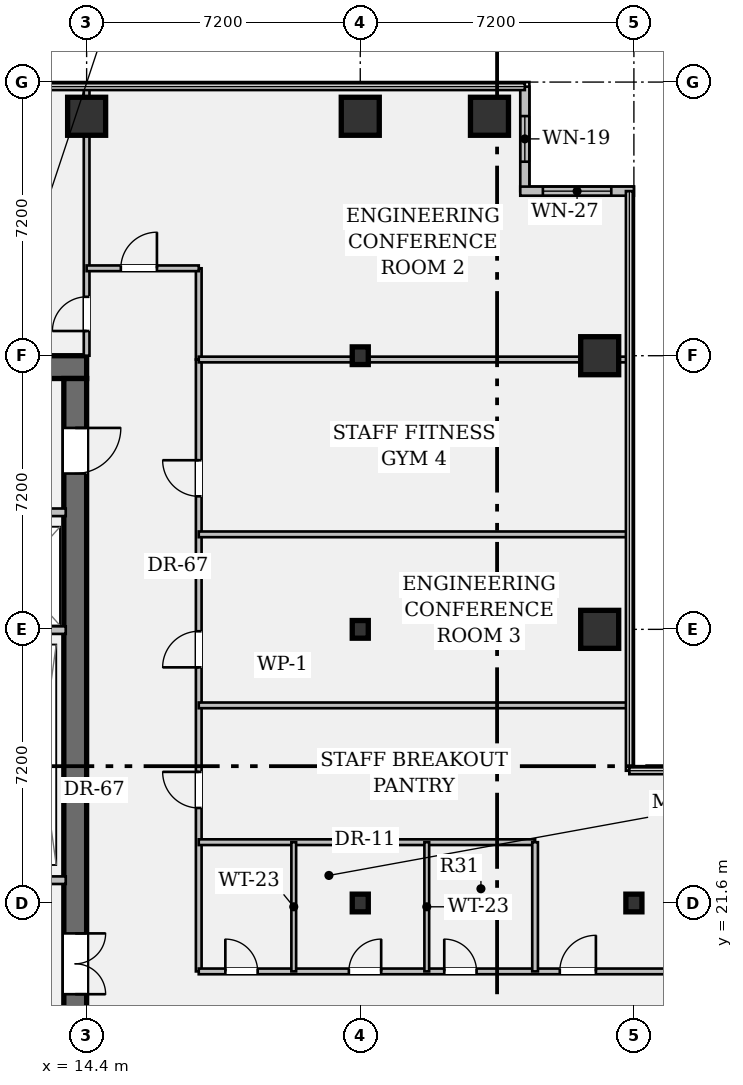
"""IFC4 building model, lengths in metres.
Left out: names, types, materials, properties, quantities, classifications, styles, units other than length and angle.
Written with IfcOpenShell. Run it as: python <this file> out.ifc"""

import sys

from ifc_helpers import new_model, si_unit, direction, frame, frame_2d, origin, origin_2d, place, context, subcontext, project, spatial, rectangle, hollow_rectangle, i_section, extrude, element, fill, save


model = new_model("IFC4")
c1 = context("Model", 3, precision=1e-05, world=origin(), true_north=direction((0.0, 1.0)))
c2 = subcontext(c1, "Body", "Model", "MODEL_VIEW")
j1 = project(units=[si_unit("LENGTHUNIT", "METRE"), si_unit("PLANEANGLEUNIT", "RADIAN")], contexts=[c1])
p1 = place(None, origin())
s1 = spatial("IfcSite", under=j1, at=p1, CompositionType="ELEMENT")
p2 = place(p1, origin())
s2 = spatial("IfcBuilding", under=s1, at=p2, CompositionType="ELEMENT")
p3 = place(p2, frame((0.0, 0.0, 73.5)))
s3 = spatial("IfcBuildingStorey", under=s2, at=p3, CompositionType="ELEMENT", Elevation=73.5)
p4 = place(p3, frame((0.6, 35.7, 0.0), z_axis=(0.0, 0.0, 1.0), x_axis=(1.0, 0.0, 0.0)))
e1 = element("IfcWall", 1, at=p4, inside=s3, PredefinedType="SHEAR", context=c2, shape_type="SweptSolid", body=[
    extrude(rectangle(XDim=13.8, YDim=0.6, at=frame_2d((6.9, 0.0))), origin(), (0.0, 0.0, 1.0), 3.57),
])
p5 = place(p3, frame((14.1, 35.4, 0.0), z_axis=(0.0, 0.0, 1.0), x_axis=(0.0, -1.0, 0.0)))
e2 = element("IfcWall", 2, at=p5, inside=s3, PredefinedType="SHEAR", context=c2, shape_type="SweptSolid", body=[
    extrude(rectangle(XDim=27.6, YDim=0.6, at=frame_2d((13.8, 0.0))), origin(), (0.0, 0.0, 1.0), 3.57),
])
p6 = place(p5, frame((1.3, 0.0, 0.0)))
e3 = element("IfcOpeningElement", 3, at=p6, cuts=e2, PredefinedType="OPENING", context=c2, shape_type="SweptSolid", body=[
    extrude(rectangle(XDim=1.2, YDim=2.15, at=frame_2d((0.6, 1.075))), frame((0.0, 0.312, 0.0), z_axis=(0.0, -1.0, 0.0), x_axis=(1.0, 0.0, 0.0)), (0.0, 0.0, 1.0), 0.624),
])
p7 = place(p5, frame((25.25, 0.0, 0.0)))
e4 = element("IfcOpeningElement", 4, at=p7, cuts=e2, PredefinedType="OPENING", context=c2, shape_type="SweptSolid", body=[
    extrude(rectangle(XDim=1.2, YDim=2.15, at=frame_2d((0.6, 1.075))), frame((0.0, 0.312, 0.0), z_axis=(0.0, -1.0, 0.0), x_axis=(1.0, 0.0, 0.0)), (0.0, 0.0, 1.0), 0.624),
])
p8 = place(p5, frame((14.6, 0.0, 0.0)))
e5 = element("IfcOpeningElement", 5, at=p8, cuts=e2, PredefinedType="OPENING", context=c2, shape_type="SweptSolid", body=[
    extrude(rectangle(XDim=1.6, YDim=2.2, at=frame_2d((0.8, 1.1))), frame((0.0, 0.312, 0.0), z_axis=(0.0, -1.0, 0.0), x_axis=(1.0, 0.0, 0.0)), (0.0, 0.0, 1.0), 0.624),
])
p9 = place(p3, frame((14.4, 42.3, 0.0), z_axis=(0.0, 0.0, 1.0), x_axis=(1.0, 0.0, 0.0)))
e6 = element("IfcColumn", 6, at=p9, inside=s3, PredefinedType="COLUMN", context=c2, shape_type="SweptSolid", body=[
    extrude(hollow_rectangle(XDim=1.0, YDim=1.0, WallThickness=0.065, at=origin_2d()), origin(), (0.0, 0.0, 1.0), 3.57),
])
for number, where, z_axis, x_axis in (
    (7, (21.6, 21.6, 0.0), (0.0, 0.0, 1.0), (1.0, 0.0, 0.0)),
    (8, (21.6, 28.8, 0.0), (0.0, 0.0, 1.0), (1.0, 0.0, 0.0)),
    (9, (21.6, 36.0, 0.0), (0.0, 0.0, 1.0), (1.0, 0.0, 0.0)),
):
    element("IfcColumn", number, at=place(p3, frame(where, z_axis=z_axis, x_axis=x_axis)), inside=s3, PredefinedType="COLUMN", context=c2, shape_type="SweptSolid", body=[
        extrude(i_section(OverallWidth=0.422, OverallDepth=0.465, WebThickness=0.045, FlangeThickness=0.073, FilletRadius=0.018, at=origin_2d()), origin(), (0.0, 0.0, 1.0), 3.57),
    ])
for number, where, z_axis, x_axis in (
    (10, (21.6, 42.3, 0.0), (0.0, 0.0, 1.0), (1.0, 0.0, 0.0)),
    (11, (25.0, 42.3, 0.0), (0.0, 0.0, 1.0), (1.0, 0.0, 0.0)),
    (12, (27.9, 28.8, 0.0), (0.0, 0.0, 1.0), (1.0, 0.0, 0.0)),
    (13, (27.9, 36.0, 0.0), (0.0, 0.0, 1.0), (1.0, 0.0, 0.0)),
):
    element("IfcColumn", number, at=place(p3, frame(where, z_axis=z_axis, x_axis=x_axis)), inside=s3, PredefinedType="COLUMN", context=c2, shape_type="SweptSolid", body=[
        extrude(hollow_rectangle(XDim=1.0, YDim=1.0, WallThickness=0.065, at=origin_2d()), origin(), (0.0, 0.0, 1.0), 3.57),
    ])
p10 = place(p3, frame((28.8, 21.6, 0.0), z_axis=(0.0, 0.0, 1.0), x_axis=(1.0, 0.0, 0.0)))
e14 = element("IfcColumn", 14, at=p10, inside=s3, PredefinedType="COLUMN", context=c2, shape_type="SweptSolid", body=[
    extrude(i_section(OverallWidth=0.422, OverallDepth=0.465, WebThickness=0.045, FlangeThickness=0.073, FilletRadius=0.018, at=origin_2d()), origin(), (0.0, 0.0, 1.0), 3.57),
])
p11 = place(p3, frame((25.93, 43.08, 0.0), z_axis=(0.0, 0.0, 1.0), x_axis=(0.0, -1.0, 0.0)))
e15 = element("IfcWall", 15, at=p11, inside=s3, PredefinedType="STANDARD", context=c2, shape_type="SweptSolid", body=[
    extrude(rectangle(XDim=2.75, YDim=0.24, at=frame_2d((1.375, 0.0))), origin(), (0.0, 0.0, 1.0), 3.57),
])
p12 = place(p11, frame((0.775, 0.0, 0.95)))
e16 = element("IfcOpeningElement", 16, at=p12, cuts=e15, PredefinedType="OPENING", context=c2, shape_type="SweptSolid", body=[
    extrude(rectangle(XDim=1.2, YDim=1.8, at=frame_2d((0.6, 0.9))), frame((0.0, 0.132, 0.0), z_axis=(0.0, -1.0, 0.0), x_axis=(1.0, 0.0, 0.0)), (0.0, 0.0, 1.0), 0.264),
])
p13 = place(p3, frame((25.81, 40.33, 0.0), z_axis=(0.0, 0.0, 1.0), x_axis=(1.0, 0.0, 0.0)))
e17 = element("IfcWall", 17, at=p13, inside=s3, PredefinedType="STANDARD", context=c2, shape_type="SweptSolid", body=[
    extrude(rectangle(XDim=2.99, YDim=0.24, at=frame_2d((1.495, 0.0))), origin(), (0.0, 0.0, 1.0), 3.57),
])
p14 = place(p13, frame((0.595, 0.0, 0.95)))
e18 = element("IfcOpeningElement", 18, at=p14, cuts=e17, PredefinedType="OPENING", context=c2, shape_type="SweptSolid", body=[
    extrude(rectangle(XDim=1.8, YDim=1.35, at=frame_2d((0.9, 0.675))), frame((0.0, 0.132, 0.0), z_axis=(0.0, -1.0, 0.0), x_axis=(1.0, 0.0, 0.0)), (0.0, 0.0, 1.0), 0.264),
])
p15 = place(p3, frame((8.7, 31.88, 0.0), z_axis=(0.0, 0.0, 1.0), x_axis=(1.0, 0.0, 0.0)))
e19 = element("IfcWall", 19, at=p15, inside=s3, PredefinedType="PARTITIONING", context=c2, shape_type="SweptSolid", body=[
    extrude(rectangle(XDim=5.15, YDim=0.2, at=frame_2d((2.575, 0.0))), origin(), (0.0, 0.0, 1.0), 3.57),
])
p16 = place(p15, frame((0.75, 0.0, 0.0)))
e20 = element("IfcOpeningElement", 20, at=p16, cuts=e19, PredefinedType="OPENING", context=c2, shape_type="SweptSolid", body=[
    extrude(rectangle(XDim=1.2, YDim=2.2, at=frame_2d((0.6, 1.1))), frame((0.0, 0.112, 0.0), z_axis=(0.0, -1.0, 0.0), x_axis=(1.0, 0.0, 0.0)), (0.0, 0.0, 1.0), 0.224),
])
p17 = place(p15, frame((3.25, 0.0, 0.0)))
e21 = element("IfcOpeningElement", 21, at=p17, cuts=e19, PredefinedType="OPENING", context=c2, shape_type="SweptSolid", body=[
    extrude(rectangle(XDim=1.2, YDim=2.2, at=frame_2d((0.6, 1.1))), frame((0.0, 0.112, 0.0), z_axis=(0.0, -1.0, 0.0), x_axis=(1.0, 0.0, 0.0)), (0.0, 0.0, 1.0), 0.224),
])
p18 = place(p3, frame((8.7, 28.78, 0.0), z_axis=(0.0, 0.0, 1.0), x_axis=(1.0, 0.0, 0.0)))
e22 = element("IfcWall", 22, at=p18, inside=s3, PredefinedType="PARTITIONING", context=c2, shape_type="SweptSolid", body=[
    extrude(rectangle(XDim=5.15, YDim=0.2, at=frame_2d((2.575, 0.0))), origin(), (0.0, 0.0, 1.0), 3.57),
])
p19 = place(p3, frame((7.1, 22.2, 0.0), z_axis=(0.0, 0.0, 1.0), x_axis=(1.0, 0.0, 0.0)))
e23 = element("IfcWall", 23, at=p19, inside=s3, PredefinedType="PARTITIONING", context=c2, shape_type="SweptSolid", body=[
    extrude(rectangle(XDim=6.75, YDim=0.2, at=frame_2d((3.375, 0.0))), origin(), (0.0, 0.0, 1.0), 3.57),
])
p20 = place(p3, frame((17.35, 19.8, 0.0), z_axis=(0.0, 0.0, 1.0), x_axis=(0.0, 1.0, 0.0)))
e24 = element("IfcWall", 24, at=p20, inside=s3, PredefinedType="PARTITIONING", context=c2, shape_type="SweptSolid", body=[
    extrude(rectangle(XDim=16.1, YDim=0.15, at=frame_2d((8.05, 0.0))), origin(), (0.0, 0.0, 1.0), 2.783),
])
p21 = place(p20, frame((4.3, 0.0, 0.0)))
e25 = element("IfcOpeningElement", 25, at=p21, cuts=e24, PredefinedType="OPENING", context=c2, shape_type="SweptSolid", body=[
    extrude(rectangle(XDim=0.95, YDim=2.15, at=frame_2d((0.475, 1.075))), frame((0.0, 0.087, 0.0), z_axis=(0.0, -1.0, 0.0), x_axis=(1.0, 0.0, 0.0)), (0.0, 0.0, 1.0), 0.174),
])
p22 = place(p20, frame((8.0, 0.0, 0.0)))
e26 = element("IfcOpeningElement", 26, at=p22, cuts=e24, PredefinedType="OPENING", context=c2, shape_type="SweptSolid", body=[
    extrude(rectangle(XDim=0.95, YDim=2.15, at=frame_2d((0.475, 1.075))), frame((0.0, 0.087, 0.0), z_axis=(0.0, -1.0, 0.0), x_axis=(1.0, 0.0, 0.0)), (0.0, 0.0, 1.0), 0.174),
])
p23 = place(p20, frame((12.5, 0.0, 0.0)))
e27 = element("IfcOpeningElement", 27, at=p23, cuts=e24, PredefinedType="OPENING", context=c2, shape_type="SweptSolid", body=[
    extrude(rectangle(XDim=0.95, YDim=2.15, at=frame_2d((0.475, 1.075))), frame((0.0, 0.087, 0.0), z_axis=(0.0, -1.0, 0.0), x_axis=(1.0, 0.0, 0.0)), (0.0, 0.0, 1.0), 0.174),
])
p24 = place(p3, frame((17.35, 19.8, 0.0), z_axis=(0.0, 0.0, 1.0), x_axis=(1.0, 0.0, 0.0)))
e28 = element("IfcWall", 28, at=p24, inside=s3, PredefinedType="PARTITIONING", context=c2, shape_type="SweptSolid", body=[
    extrude(rectangle(XDim=21.85, YDim=0.15, at=frame_2d((10.925, 0.0))), origin(), (0.0, 0.0, 1.0), 2.783),
])
p25 = place(p24, frame((0.7, 0.0, 0.0)))
e29 = element("IfcOpeningElement", 29, at=p25, cuts=e28, PredefinedType="OPENING", context=c2, shape_type="SweptSolid", body=[
    extrude(rectangle(XDim=0.85, YDim=2.15, at=frame_2d((0.425, 1.075))), frame((0.0, 0.087, 0.0), z_axis=(0.0, -1.0, 0.0), x_axis=(1.0, 0.0, 0.0)), (0.0, 0.0, 1.0), 0.174),
])
p26 = place(p24, frame((3.95, 0.0, 0.0)))
e30 = element("IfcOpeningElement", 30, at=p26, cuts=e28, PredefinedType="OPENING", context=c2, shape_type="SweptSolid", body=[
    extrude(rectangle(XDim=0.85, YDim=2.15, at=frame_2d((0.425, 1.075))), frame((0.0, 0.087, 0.0), z_axis=(0.0, -1.0, 0.0), x_axis=(1.0, 0.0, 0.0)), (0.0, 0.0, 1.0), 0.174),
])
p27 = place(p24, frame((6.46, 0.0, 0.0)))
e31 = element("IfcOpeningElement", 31, at=p27, cuts=e28, PredefinedType="OPENING", context=c2, shape_type="SweptSolid", body=[
    extrude(rectangle(XDim=0.85, YDim=2.15, at=frame_2d((0.425, 1.075))), frame((0.0, 0.087, 0.0), z_axis=(0.0, -1.0, 0.0), x_axis=(1.0, 0.0, 0.0)), (0.0, 0.0, 1.0), 0.174),
])
p28 = place(p24, frame((9.5, 0.0, 0.0)))
e32 = element("IfcOpeningElement", 32, at=p28, cuts=e28, PredefinedType="OPENING", context=c2, shape_type="SweptSolid", body=[
    extrude(rectangle(XDim=0.95, YDim=2.15, at=frame_2d((0.475, 1.075))), frame((0.0, 0.087, 0.0), z_axis=(0.0, -1.0, 0.0), x_axis=(1.0, 0.0, 0.0)), (0.0, 0.0, 1.0), 0.174),
])
p29 = place(p3, frame((14.4, 36.0, 0.0), z_axis=(0.0, 0.0, 1.0), x_axis=(0.0, 1.0, 0.0)))
e33 = element("IfcWall", 33, at=p29, inside=s3, PredefinedType="PARTITIONING", context=c2, shape_type="SweptSolid", body=[
    extrude(rectangle(XDim=7.08, YDim=0.15, at=frame_2d((3.54, 0.0))), origin(), (0.0, 0.0, 1.0), 2.783),
])
p30 = place(p29, frame((0.65, 0.0, 0.0)))
e34 = element("IfcOpeningElement", 34, at=p30, cuts=e33, PredefinedType="OPENING", context=c2, shape_type="SweptSolid", body=[
    extrude(rectangle(XDim=0.9, YDim=2.15, at=frame_2d((0.45, 1.075))), frame((0.0, 0.087, 0.0), z_axis=(0.0, -1.0, 0.0), x_axis=(1.0, 0.0, 0.0)), (0.0, 0.0, 1.0), 0.174),
])
p31 = place(p3, frame((17.35, 35.9, 0.0), z_axis=(0.0, 0.0, 1.0), x_axis=(0.0, 1.0, 0.0)))
e35 = element("IfcWall", 35, at=p31, inside=s3, PredefinedType="PARTITIONING", context=c2, shape_type="SweptSolid", body=[
    extrude(rectangle(XDim=2.4, YDim=0.15, at=frame_2d((1.2, 0.0))), origin(), (0.0, 0.0, 1.0), 2.783),
])
p32 = place(p3, frame((14.4, 38.3, 0.0), z_axis=(0.0, 0.0, 1.0), x_axis=(1.0, 0.0, 0.0)))
e36 = element("IfcWall", 36, at=p32, inside=s3, PredefinedType="PARTITIONING", context=c2, shape_type="SweptSolid", body=[
    extrude(rectangle(XDim=2.95, YDim=0.15, at=frame_2d((1.475, 0.0))), origin(), (0.0, 0.0, 1.0), 2.783),
])
p33 = place(p32, frame((0.9, 0.0, 0.0)))
e37 = element("IfcOpeningElement", 37, at=p33, cuts=e36, PredefinedType="OPENING", context=c2, shape_type="SweptSolid", body=[
    extrude(rectangle(XDim=0.95, YDim=2.15, at=frame_2d((0.475, 1.075))), frame((0.0, 0.087, 0.0), z_axis=(0.0, -1.0, 0.0), x_axis=(1.0, 0.0, 0.0)), (0.0, 0.0, 1.0), 0.174),
])
p34 = place(p3, frame((17.35, 35.9, 0.0), z_axis=(0.0, 0.0, 1.0), x_axis=(1.0, 0.0, 0.0)))
e38 = element("IfcWall", 38, at=p34, inside=s3, PredefinedType="PARTITIONING", context=c2, shape_type="SweptSolid", body=[
    extrude(rectangle(XDim=11.33, YDim=0.15, at=frame_2d((5.665, 0.0))), origin(), (0.0, 0.0, 1.0), 2.783),
])
p35 = place(p3, frame((17.35, 23.2, 0.0), z_axis=(0.0, 0.0, 1.0), x_axis=(1.0, 0.0, 0.0)))
e39 = element("IfcWall", 39, at=p35, inside=s3, PredefinedType="PARTITIONING", context=c2, shape_type="SweptSolid", body=[
    extrude(rectangle(XDim=8.85, YDim=0.15, at=frame_2d((4.425, 0.0))), origin(), (0.0, 0.0, 1.0), 2.783),
])
p36 = place(p3, frame((26.2, 19.8, 0.0), z_axis=(0.0, 0.0, 1.0), x_axis=(0.0, 1.0, 0.0)))
e40 = element("IfcWall", 40, at=p36, inside=s3, PredefinedType="PARTITIONING", context=c2, shape_type="SweptSolid", body=[
    extrude(rectangle(XDim=3.4, YDim=0.15, at=frame_2d((1.7, 0.0))), origin(), (0.0, 0.0, 1.0), 2.783),
])
for number, where, z_axis, x_axis in (
    (41, (19.85, 19.8, 0.0), (0.0, 0.0, 1.0), (0.0, 1.0, 0.0)),
    (42, (23.35, 19.8, 0.0), (0.0, 0.0, 1.0), (0.0, 1.0, 0.0)),
):
    element("IfcWall", number, at=place(p3, frame(where, z_axis=z_axis, x_axis=x_axis)), inside=s3, PredefinedType="PARTITIONING", context=c2, shape_type="SweptSolid", body=[
        extrude(rectangle(XDim=3.4, YDim=0.125, at=frame_2d((1.7, 0.0))), origin(), (0.0, 0.0, 1.0), 2.783),
    ])
for number, where, z_axis, x_axis in (
    (43, (17.35, 26.8, 0.0), (0.0, 0.0, 1.0), (1.0, 0.0, 0.0)),
    (44, (17.35, 31.3, 0.0), (0.0, 0.0, 1.0), (1.0, 0.0, 0.0)),
):
    element("IfcWall", number, at=place(p3, frame(where, z_axis=z_axis, x_axis=x_axis)), inside=s3, PredefinedType="PARTITIONING", context=c2, shape_type="SweptSolid", body=[
        extrude(rectangle(XDim=11.33, YDim=0.15, at=frame_2d((5.665, 0.0))), origin(), (0.0, 0.0, 1.0), 2.783),
    ])
p37 = place(p12, origin())
e45 = element("IfcWindow", 45, at=p37, inside=s3, PartitioningType="SINGLE_PANEL", PredefinedType="WINDOW", context=c2, shape_type="SweptSolid", body=[
    extrude(rectangle(XDim=1.2, YDim=1.8, at=frame_2d((0.6, 0.9))), frame((0.0, 0.03, 0.0), z_axis=(0.0, -1.0, 0.0), x_axis=(1.0, 0.0, 0.0)), (0.0, 0.0, 1.0), 0.06),
])
fill(e16, e45)
p38 = place(p14, origin())
e46 = element("IfcWindow", 46, at=p38, inside=s3, PartitioningType="SINGLE_PANEL", PredefinedType="WINDOW", context=c2, shape_type="SweptSolid", body=[
    extrude(rectangle(XDim=1.8, YDim=1.35, at=frame_2d((0.9, 0.675))), frame((0.0, 0.03, 0.0), z_axis=(0.0, -1.0, 0.0), x_axis=(1.0, 0.0, 0.0)), (0.0, 0.0, 1.0), 0.06),
])
fill(e18, e46)
p39 = place(p6, origin())
e47 = element("IfcDoor", 47, at=p39, inside=s3, OperationType="SINGLE_SWING_LEFT", PredefinedType="DOOR", context=c2, shape_type="SweptSolid", body=[
    extrude(rectangle(XDim=1.2, YDim=2.15, at=frame_2d((0.6, 1.075))), frame((0.0, 0.025, 0.0), z_axis=(0.0, -1.0, 0.0), x_axis=(1.0, 0.0, 0.0)), (0.0, 0.0, 1.0), 0.05),
])
fill(e3, e47)
p40 = place(p8, origin())
e48 = element("IfcDoor", 48, at=p40, inside=s3, OperationType="DOUBLE_DOOR_SINGLE_SWING", PredefinedType="DOOR", context=c2, shape_type="SweptSolid", body=[
    extrude(rectangle(XDim=1.6, YDim=2.2, at=frame_2d((0.8, 1.1))), frame((0.0, 0.025, 0.0), z_axis=(0.0, -1.0, 0.0), x_axis=(1.0, 0.0, 0.0)), (0.0, 0.0, 1.0), 0.05),
])
fill(e5, e48)
p41 = place(p30, origin())
e49 = element("IfcDoor", 49, at=p41, inside=s3, OperationType="SINGLE_SWING_LEFT", PredefinedType="DOOR", context=c2, shape_type="SweptSolid", body=[
    extrude(rectangle(XDim=0.9, YDim=2.15, at=frame_2d((0.45, 1.075))), frame((0.0, 0.025, 0.0), z_axis=(0.0, -1.0, 0.0), x_axis=(1.0, 0.0, 0.0)), (0.0, 0.0, 1.0), 0.05),
])
fill(e34, e49)
p42 = place(p33, origin())
e50 = element("IfcDoor", 50, at=p42, inside=s3, OperationType="SINGLE_SWING_RIGHT", PredefinedType="DOOR", context=c2, shape_type="SweptSolid", body=[
    extrude(rectangle(XDim=0.95, YDim=2.15, at=frame_2d((0.475, 1.075))), frame((0.0, 0.025, 0.0), z_axis=(0.0, -1.0, 0.0), x_axis=(1.0, 0.0, 0.0)), (0.0, 0.0, 1.0), 0.05),
])
fill(e37, e50)
p43 = place(p25, origin())
e51 = element("IfcDoor", 51, at=p43, inside=s3, OperationType="SINGLE_SWING_LEFT", PredefinedType="DOOR", context=c2, shape_type="SweptSolid", body=[
    extrude(rectangle(XDim=0.85, YDim=2.15, at=frame_2d((0.425, 1.075))), frame((0.0, 0.025, 0.0), z_axis=(0.0, -1.0, 0.0), x_axis=(1.0, 0.0, 0.0)), (0.0, 0.0, 1.0), 0.05),
])
fill(e29, e51)
p44 = place(p26, origin())
e52 = element("IfcDoor", 52, at=p44, inside=s3, OperationType="SINGLE_SWING_RIGHT", PredefinedType="DOOR", context=c2, shape_type="SweptSolid", body=[
    extrude(rectangle(XDim=0.85, YDim=2.15, at=frame_2d((0.425, 1.075))), frame((0.0, 0.025, 0.0), z_axis=(0.0, -1.0, 0.0), x_axis=(1.0, 0.0, 0.0)), (0.0, 0.0, 1.0), 0.05),
])
fill(e30, e52)
p45 = place(p27, origin())
e53 = element("IfcDoor", 53, at=p45, inside=s3, OperationType="SINGLE_SWING_LEFT", PredefinedType="DOOR", context=c2, shape_type="SweptSolid", body=[
    extrude(rectangle(XDim=0.85, YDim=2.15, at=frame_2d((0.425, 1.075))), frame((0.0, 0.025, 0.0), z_axis=(0.0, -1.0, 0.0), x_axis=(1.0, 0.0, 0.0)), (0.0, 0.0, 1.0), 0.05),
])
fill(e31, e53)
p46 = place(p21, origin())
e54 = element("IfcDoor", 54, at=p46, inside=s3, OperationType="SINGLE_SWING_RIGHT", PredefinedType="DOOR", context=c2, shape_type="SweptSolid", body=[
    extrude(rectangle(XDim=0.95, YDim=2.15, at=frame_2d((0.475, 1.075))), frame((0.0, 0.025, 0.0), z_axis=(0.0, -1.0, 0.0), x_axis=(1.0, 0.0, 0.0)), (0.0, 0.0, 1.0), 0.05),
])
fill(e25, e54)
p47 = place(p22, origin())
e55 = element("IfcDoor", 55, at=p47, inside=s3, OperationType="SINGLE_SWING_LEFT", PredefinedType="DOOR", context=c2, shape_type="SweptSolid", body=[
    extrude(rectangle(XDim=0.95, YDim=2.15, at=frame_2d((0.475, 1.075))), frame((0.0, 0.025, 0.0), z_axis=(0.0, -1.0, 0.0), x_axis=(1.0, 0.0, 0.0)), (0.0, 0.0, 1.0), 0.05),
])
fill(e26, e55)
p48 = place(p23, origin())
e56 = element("IfcDoor", 56, at=p48, inside=s3, OperationType="SINGLE_SWING_RIGHT", PredefinedType="DOOR", context=c2, shape_type="SweptSolid", body=[
    extrude(rectangle(XDim=0.95, YDim=2.15, at=frame_2d((0.475, 1.075))), frame((0.0, 0.025, 0.0), z_axis=(0.0, -1.0, 0.0), x_axis=(1.0, 0.0, 0.0)), (0.0, 0.0, 1.0), 0.05),
])
fill(e27, e56)
p49 = place(p28, origin())
e57 = element("IfcDoor", 57, at=p49, inside=s3, OperationType="SINGLE_SWING_RIGHT", PredefinedType="DOOR", context=c2, shape_type="SweptSolid", body=[
    extrude(rectangle(XDim=0.95, YDim=2.15, at=frame_2d((0.475, 1.075))), frame((0.0, 0.025, 0.0), z_axis=(0.0, -1.0, 0.0), x_axis=(1.0, 0.0, 0.0)), (0.0, 0.0, 1.0), 0.05),
])
fill(e32, e57)
save(model, sys.argv[1])
